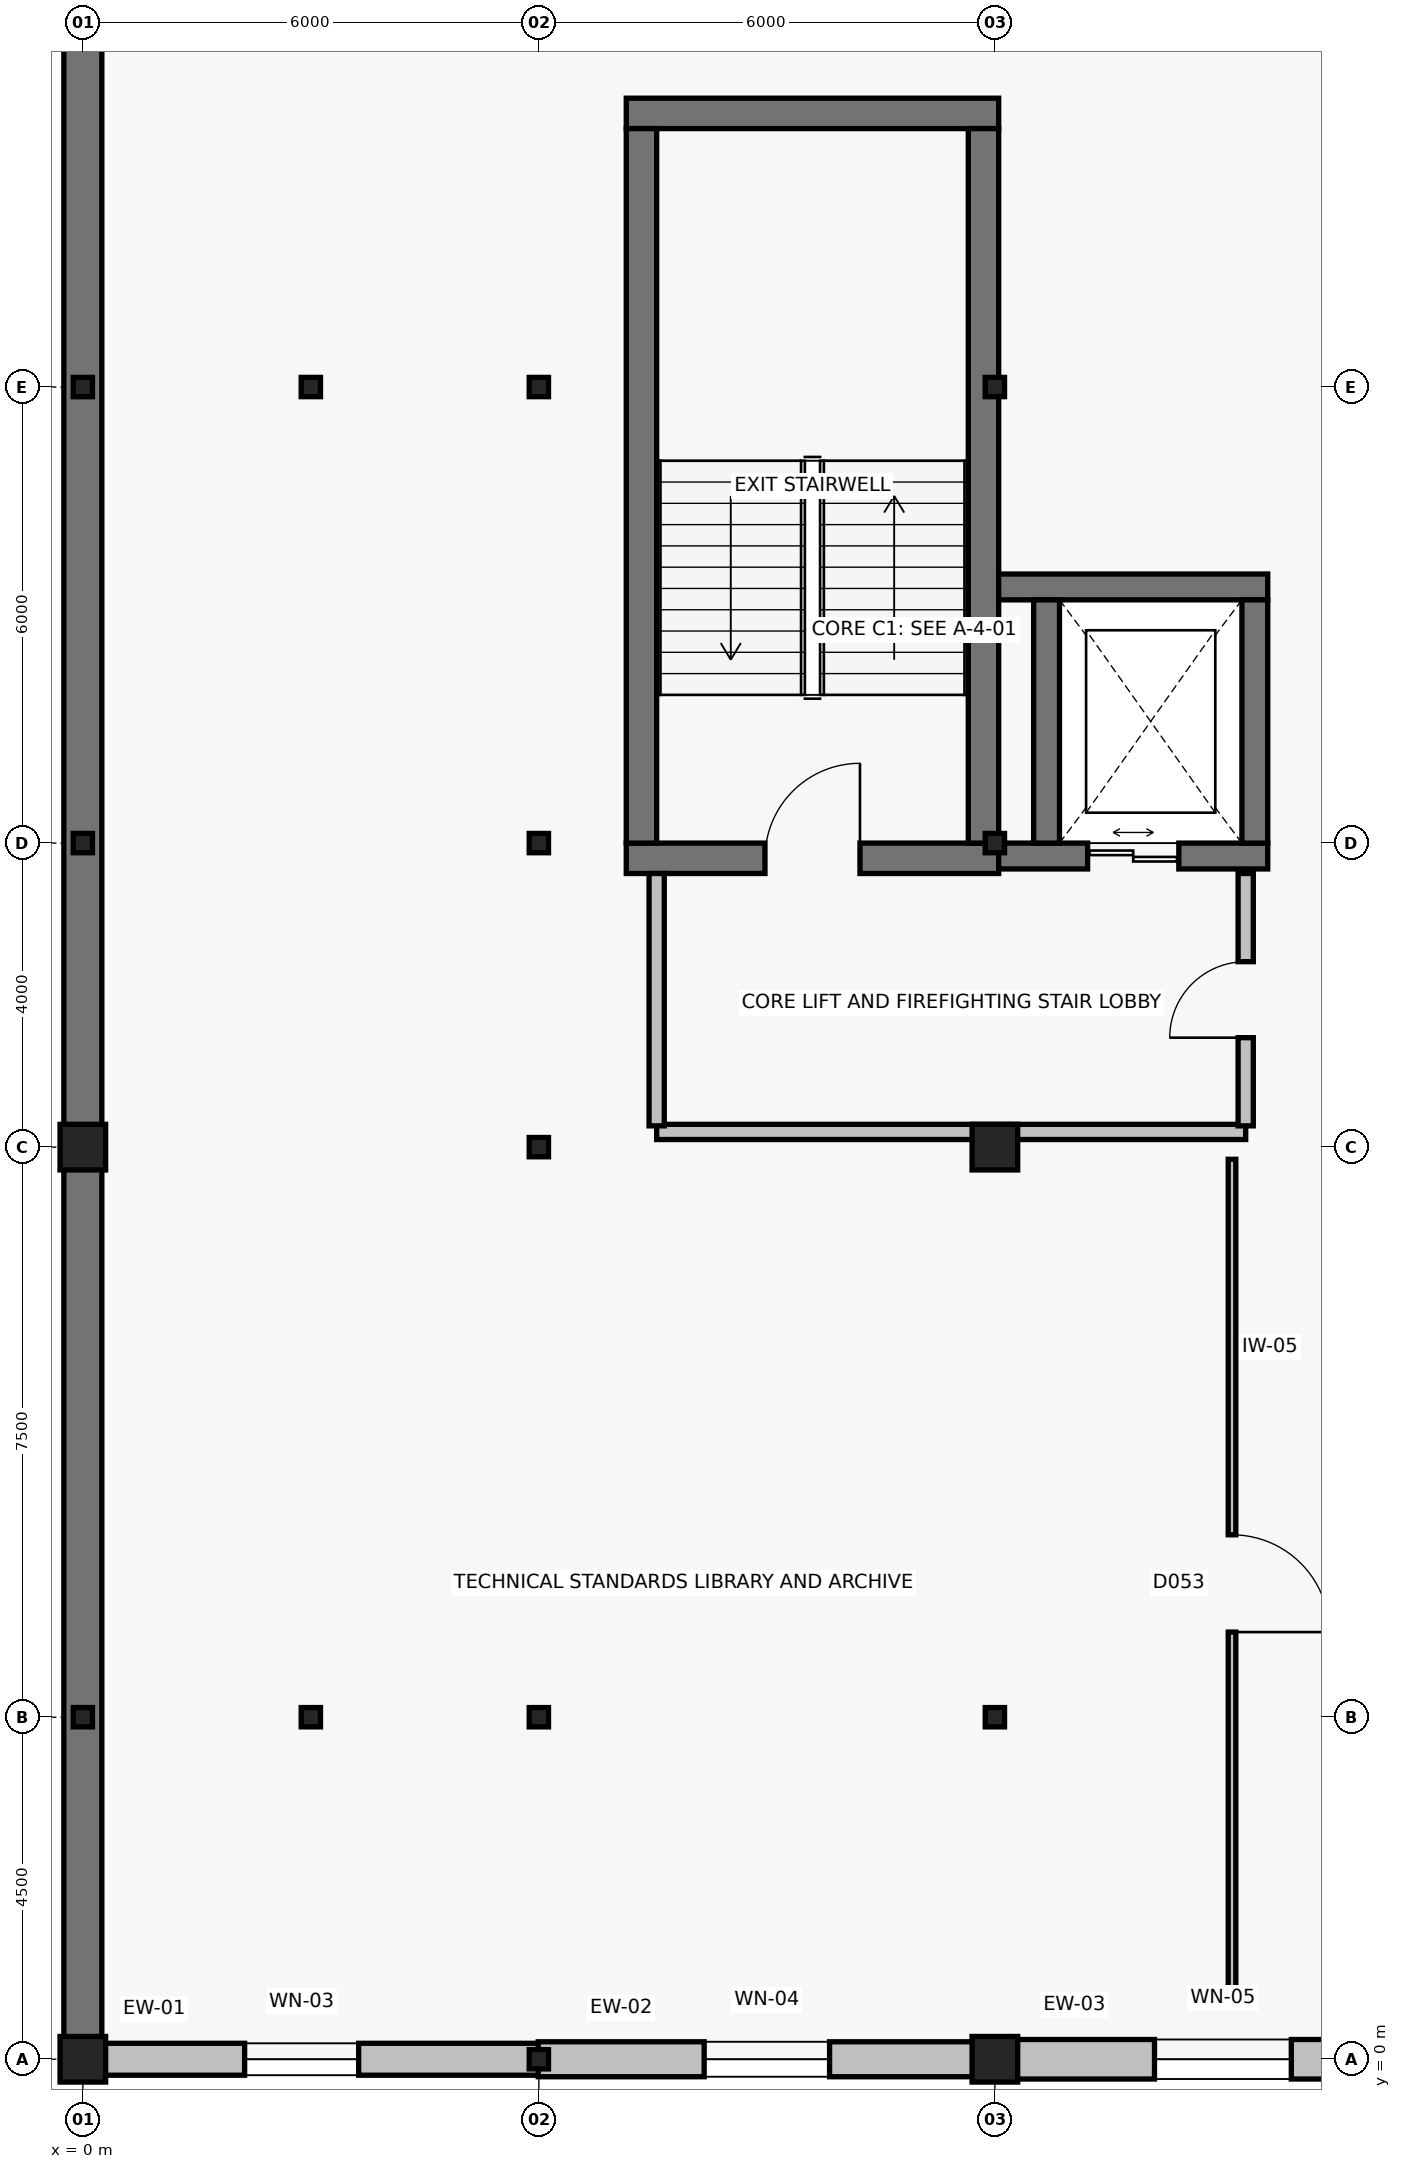
"""IFC4 building model, lengths in metres.
Left out: names, types, materials, properties, quantities, classifications, styles, units other than length and angle.
Written with IfcOpenShell. Run it as: python <this file> out.ifc"""

import sys

from ifc_helpers import new_model, si_unit, direction, frame, frame_2d, origin, origin_with_axes, origin_2d, place, context, subcontext, project, spatial, rectangle, hollow_rectangle, extrude, element, fill, save


model = new_model("IFC4")
c1 = context("Model", 3, precision=1e-05, world=origin(), true_north=direction((0.0, 1.0)))
c2 = subcontext(c1, "Body", "Model", "MODEL_VIEW")
j1 = project(units=[si_unit("LENGTHUNIT", "METRE"), si_unit("PLANEANGLEUNIT", "RADIAN")], contexts=[c1])
p1 = place(None, origin())
s1 = spatial("IfcSite", under=j1, at=p1, CompositionType="ELEMENT")
p2 = place(p1, origin())
s2 = spatial("IfcBuilding", under=s1, at=p2, CompositionType="ELEMENT")
p3 = place(p2, frame((0.0, 0.0, 15.4)))
s3 = spatial("IfcBuildingStorey", under=s2, at=p3, CompositionType="ELEMENT", Elevation=15.4)
p4 = place(p3, origin_with_axes())
e1 = element("IfcColumn", 1, at=p4, inside=s3, PredefinedType="COLUMN", context=c2, shape_type="SweptSolid", body=[
    extrude(rectangle(XDim=0.6, YDim=0.6, at=origin_2d()), origin(), (0.0, 0.0, 1.0), 4.0),
])
p5 = place(p3, frame((0.0, 4.5, 0.0), z_axis=(0.0, 0.0, 1.0), x_axis=(1.0, 0.0, 0.0)))
e2 = element("IfcColumn", 2, at=p5, inside=s3, PredefinedType="COLUMN", context=c2, shape_type="SweptSolid", body=[
    extrude(hollow_rectangle(XDim=0.254, YDim=0.254, WallThickness=0.01, InnerFilletRadius=0.01, OuterFilletRadius=0.019, at=origin_2d()), origin(), (0.0, 0.0, 1.0), 4.0),
])
p6 = place(p3, frame((0.0, 12.0, 0.0), z_axis=(0.0, 0.0, 1.0), x_axis=(1.0, 0.0, 0.0)))
e3 = element("IfcColumn", 3, at=p6, inside=s3, PredefinedType="COLUMN", context=c2, shape_type="SweptSolid", body=[
    extrude(rectangle(XDim=0.6, YDim=0.6, at=origin_2d()), origin(), (0.0, 0.0, 1.0), 4.0),
])
for number, where, z_axis, x_axis in (
    (4, (0.0, 16.0, 0.0), (0.0, 0.0, 1.0), (1.0, 0.0, 0.0)),
    (5, (0.0, 22.0, 0.0), (0.0, 0.0, 1.0), (1.0, 0.0, 0.0)),
    (6, (3.0, 4.5, 0.0), (0.0, 0.0, 1.0), (1.0, 0.0, 0.0)),
    (7, (3.0, 22.0, 0.0), (0.0, 0.0, 1.0), (1.0, 0.0, 0.0)),
    (8, (6.0, 0.0, 0.0), (0.0, 0.0, 1.0), (1.0, 0.0, 0.0)),
    (9, (6.0, 4.5, 0.0), (0.0, 0.0, 1.0), (1.0, 0.0, 0.0)),
    (10, (6.0, 12.0, 0.0), (0.0, 0.0, 1.0), (1.0, 0.0, 0.0)),
    (11, (6.0, 16.0, 0.0), (0.0, 0.0, 1.0), (1.0, 0.0, 0.0)),
    (12, (6.0, 22.0, 0.0), (0.0, 0.0, 1.0), (1.0, 0.0, 0.0)),
):
    element("IfcColumn", number, at=place(p3, frame(where, z_axis=z_axis, x_axis=x_axis)), inside=s3, PredefinedType="COLUMN", context=c2, shape_type="SweptSolid", body=[
        extrude(hollow_rectangle(XDim=0.254, YDim=0.254, WallThickness=0.01, InnerFilletRadius=0.01, OuterFilletRadius=0.019, at=origin_2d()), origin(), (0.0, 0.0, 1.0), 4.0),
    ])
p7 = place(p3, frame((12.0, 0.0, 0.0), z_axis=(0.0, 0.0, 1.0), x_axis=(1.0, 0.0, 0.0)))
e13 = element("IfcColumn", 13, at=p7, inside=s3, PredefinedType="COLUMN", context=c2, shape_type="SweptSolid", body=[
    extrude(rectangle(XDim=0.6, YDim=0.6, at=origin_2d()), origin(), (0.0, 0.0, 1.0), 4.0),
])
p8 = place(p3, frame((12.0, 4.5, 0.0), z_axis=(0.0, 0.0, 1.0), x_axis=(1.0, 0.0, 0.0)))
e14 = element("IfcColumn", 14, at=p8, inside=s3, PredefinedType="COLUMN", context=c2, shape_type="SweptSolid", body=[
    extrude(hollow_rectangle(XDim=0.254, YDim=0.254, WallThickness=0.01, InnerFilletRadius=0.01, OuterFilletRadius=0.019, at=origin_2d()), origin(), (0.0, 0.0, 1.0), 4.0),
])
p9 = place(p3, frame((12.0, 12.0, 0.0), z_axis=(0.0, 0.0, 1.0), x_axis=(1.0, 0.0, 0.0)))
e15 = element("IfcColumn", 15, at=p9, inside=s3, PredefinedType="COLUMN", context=c2, shape_type="SweptSolid", body=[
    extrude(rectangle(XDim=0.6, YDim=0.6, at=origin_2d()), origin(), (0.0, 0.0, 1.0), 4.0),
])
for number, where, z_axis, x_axis in (
    (16, (12.0, 16.0, 0.0), (0.0, 0.0, 1.0), (1.0, 0.0, 0.0)),
    (17, (12.0, 22.0, 0.0), (0.0, 0.0, 1.0), (1.0, 0.0, 0.0)),
):
    element("IfcColumn", number, at=place(p3, frame(where, z_axis=z_axis, x_axis=x_axis)), inside=s3, PredefinedType="COLUMN", context=c2, shape_type="SweptSolid", body=[
        extrude(hollow_rectangle(XDim=0.254, YDim=0.254, WallThickness=0.01, InnerFilletRadius=0.01, OuterFilletRadius=0.019, at=origin_2d()), origin(), (0.0, 0.0, 1.0), 4.0),
    ])
p10 = place(p3, frame((0.0, -0.008, 0.0), z_axis=(0.0, 0.0, 1.0), x_axis=(0.0, 1.0, 0.0)))
e18 = element("IfcWall", 18, at=p10, inside=s3, PredefinedType="SOLIDWALL", context=c2, shape_type="SweptSolid", body=[
    extrude(rectangle(XDim=74.016, YDim=0.5, at=frame_2d((37.008, 0.0))), origin(), (0.0, 0.0, 1.0), 3.68),
])
p11 = place(p3, frame((-0.25, 0.0, 0.0), z_axis=(0.0, 0.0, 1.0), x_axis=(1.0, 0.0, 0.0)))
e19 = element("IfcWall", 19, at=p11, inside=s3, PredefinedType="SOLIDWALL", context=c2, shape_type="SweptSolid", body=[
    extrude(rectangle(XDim=6.258, YDim=0.42, at=frame_2d((3.129, 0.0))), origin(), (0.0, 0.0, 1.0), 3.111),
])
p12 = place(p11, frame((2.379, 0.0, 0.9)))
e20 = element("IfcOpeningElement", 20, at=p12, cuts=e19, PredefinedType="OPENING", context=c2, shape_type="SweptSolid", body=[
    extrude(rectangle(XDim=1.5, YDim=1.8, at=frame_2d((0.75, 0.9))), frame((0.0, 0.225, 0.0), z_axis=(0.0, -1.0, 0.0), x_axis=(1.0, 0.0, 0.0)), (0.0, 0.0, 1.0), 0.45),
])
p13 = place(p3, frame((5.992, 0.0, 0.0), z_axis=(0.0, 0.0, 1.0), x_axis=(1.0, 0.0, 0.0)))
e21 = element("IfcWall", 21, at=p13, inside=s3, PredefinedType="SOLIDWALL", context=c2, shape_type="SweptSolid", body=[
    extrude(rectangle(XDim=6.016, YDim=0.46, at=frame_2d((3.008, 0.0))), origin(), (0.0, 0.0, 1.0), 3.111),
])
p14 = place(p13, frame((2.183, 0.0, 0.9)))
e22 = element("IfcOpeningElement", 22, at=p14, cuts=e21, PredefinedType="OPENING", context=c2, shape_type="SweptSolid", body=[
    extrude(rectangle(XDim=1.65, YDim=1.8, at=frame_2d((0.825, 0.9))), frame((0.0, 0.245, 0.0), z_axis=(0.0, -1.0, 0.0), x_axis=(1.0, 0.0, 0.0)), (0.0, 0.0, 1.0), 0.49),
])
p15 = place(p3, frame((11.992, 0.0, 0.0), z_axis=(0.0, 0.0, 1.0), x_axis=(1.0, 0.0, 0.0)))
e23 = element("IfcWall", 23, at=p15, inside=s3, PredefinedType="SOLIDWALL", context=c2, shape_type="SweptSolid", body=[
    extrude(rectangle(XDim=6.016, YDim=0.52, at=frame_2d((3.008, 0.0))), origin(), (0.0, 0.0, 1.0), 3.111),
])
p16 = place(p15, frame((2.108, 0.0, 0.9)))
e24 = element("IfcOpeningElement", 24, at=p16, cuts=e23, PredefinedType="OPENING", context=c2, shape_type="SweptSolid", body=[
    extrude(rectangle(XDim=1.8, YDim=1.8, at=frame_2d((0.9, 0.9))), frame((0.0, 0.275, 0.0), z_axis=(0.0, -1.0, 0.0), x_axis=(1.0, 0.0, 0.0)), (0.0, 0.0, 1.0), 0.55),
])
p17 = place(p3, frame((7.15, 15.8, 0.0), z_axis=(0.0, 0.0, 1.0), x_axis=(1.0, 0.0, 0.0)))
e25 = element("IfcWall", 25, at=p17, inside=s3, PredefinedType="SHEAR", context=c2, shape_type="SweptSolid", body=[
    extrude(rectangle(XDim=4.9, YDim=0.4, at=frame_2d((2.45, 0.0))), origin(), (0.0, 0.0, 1.0), 3.7),
])
p18 = place(p17, frame((1.825, 0.0, 0.0)))
e26 = element("IfcOpeningElement", 26, at=p18, cuts=e25, PredefinedType="OPENING", context=c2, shape_type="SweptSolid", body=[
    extrude(rectangle(XDim=1.25, YDim=2.2, at=frame_2d((0.625, 1.1))), frame((0.0, 0.215, 0.0), z_axis=(0.0, -1.0, 0.0), x_axis=(1.0, 0.0, 0.0)), (0.0, 0.0, 1.0), 0.43),
])
p19 = place(p3, frame((12.05, 25.6, 0.0), z_axis=(0.0, 0.0, 1.0), x_axis=(-1.0, 0.0, 0.0)))
e27 = element("IfcWall", 27, at=p19, inside=s3, PredefinedType="SHEAR", context=c2, shape_type="SweptSolid", body=[
    extrude(rectangle(XDim=4.9, YDim=0.4, at=frame_2d((2.45, 0.0))), origin(), (0.0, 0.0, 1.0), 3.7),
])
for number, where, z_axis, x_axis in (
    (28, (7.35, 25.4, 0.0), (0.0, 0.0, 1.0), (0.0, -1.0, 0.0)),
    (29, (11.85, 16.0, 0.0), (0.0, 0.0, 1.0), (0.0, 1.0, 0.0)),
):
    element("IfcWall", number, at=place(p3, frame(where, z_axis=z_axis, x_axis=x_axis)), inside=s3, PredefinedType="SHEAR", context=c2, shape_type="SweptSolid", body=[
        extrude(rectangle(XDim=9.4, YDim=0.4, at=frame_2d((4.7, 0.0))), origin(), (0.0, 0.0, 1.0), 3.7),
    ])
p20 = place(p3, frame((12.05, 15.83, 0.0), z_axis=(0.0, 0.0, 1.0), x_axis=(1.0, 0.0, 0.0)))
e30 = element("IfcWall", 30, at=p20, inside=s3, PredefinedType="SHEAR", context=c2, shape_type="SweptSolid", body=[
    extrude(rectangle(XDim=3.54, YDim=0.34, at=frame_2d((1.77, 0.0))), origin(), (0.0, 0.0, 1.0), 3.7),
])
p21 = place(p20, frame((1.17, 0.0, 0.0)))
e31 = element("IfcOpeningElement", 31, at=p21, cuts=e30, PredefinedType="OPENING", context=c2, shape_type="SweptSolid", body=[
    extrude(rectangle(XDim=1.2, YDim=2.2, at=frame_2d((0.6, 1.1))), frame((0.0, 0.185, 0.0), z_axis=(0.0, -1.0, 0.0), x_axis=(1.0, 0.0, 0.0)), (0.0, 0.0, 1.0), 0.37),
])
p22 = place(p3, frame((15.59, 19.37, 0.0), z_axis=(0.0, 0.0, 1.0), x_axis=(-1.0, 0.0, 0.0)))
e32 = element("IfcWall", 32, at=p22, inside=s3, PredefinedType="SHEAR", context=c2, shape_type="SweptSolid", body=[
    extrude(rectangle(XDim=3.54, YDim=0.34, at=frame_2d((1.77, 0.0))), origin(), (0.0, 0.0, 1.0), 3.7),
])
for number, where, z_axis, x_axis in (
    (33, (12.68, 19.2, 0.0), (0.0, 0.0, 1.0), (0.0, -1.0, 0.0)),
    (34, (15.42, 16.0, 0.0), (0.0, 0.0, 1.0), (0.0, 1.0, 0.0)),
):
    element("IfcWall", number, at=place(p3, frame(where, z_axis=z_axis, x_axis=x_axis)), inside=s3, PredefinedType="SHEAR", context=c2, shape_type="SweptSolid", body=[
        extrude(rectangle(XDim=3.2, YDim=0.34, at=frame_2d((1.6, 0.0))), origin(), (0.0, 0.0, 1.0), 3.7),
    ])
p23 = place(p3, frame((7.55, 12.2, 0.0), z_axis=(0.0, 0.0, 1.0), x_axis=(1.0, 0.0, 0.0)))
e35 = element("IfcWall", 35, at=p23, inside=s3, PredefinedType="PARTITIONING", context=c2, shape_type="SweptSolid", body=[
    extrude(rectangle(XDim=7.75, YDim=0.2, at=frame_2d((3.875, 0.0))), origin(), (0.0, 0.0, 1.0), 3.111),
])
p24 = place(p3, frame((7.55, 15.6, 0.0), z_axis=(0.0, 0.0, 1.0), x_axis=(0.0, -1.0, 0.0)))
e36 = element("IfcWall", 36, at=p24, inside=s3, PredefinedType="PARTITIONING", context=c2, shape_type="SweptSolid", body=[
    extrude(rectangle(XDim=3.32, YDim=0.2, at=frame_2d((1.66, 0.0))), origin(), (0.0, 0.0, 1.0), 3.296),
])
p25 = place(p3, frame((15.3, 12.28, 0.0), z_axis=(0.0, 0.0, 1.0), x_axis=(0.0, 1.0, 0.0)))
e37 = element("IfcWall", 37, at=p25, inside=s3, PredefinedType="PARTITIONING", context=c2, shape_type="SweptSolid", body=[
    extrude(rectangle(XDim=3.32, YDim=0.2, at=frame_2d((1.66, 0.0))), origin(), (0.0, 0.0, 1.0), 3.111),
])
p26 = place(p25, frame((1.16, 0.0, 0.0)))
e38 = element("IfcOpeningElement", 38, at=p26, cuts=e37, PredefinedType="OPENING", context=c2, shape_type="SweptSolid", body=[
    extrude(rectangle(XDim=1.0, YDim=2.15, at=frame_2d((0.5, 1.075))), frame((0.0, 0.115, 0.0), z_axis=(0.0, -1.0, 0.0), x_axis=(1.0, 0.0, 0.0)), (0.0, 0.0, 1.0), 0.23),
])
p27 = place(p3, frame((15.12, 11.84, 0.0), z_axis=(0.0, 0.0, 1.0), x_axis=(0.0, -1.0, 0.0)))
e39 = element("IfcWall", 39, at=p27, inside=s3, PredefinedType="PARTITIONING", context=c2, shape_type="SweptSolid", body=[
    extrude(rectangle(XDim=11.16, YDim=0.1, at=frame_2d((5.58, 0.0))), origin(), (0.0, 0.0, 1.0), 3.111),
])
p28 = place(p27, frame((4.94, 0.0, 0.0)))
e40 = element("IfcOpeningElement", 40, at=p28, cuts=e39, PredefinedType="OPENING", context=c2, shape_type="SweptSolid", body=[
    extrude(rectangle(XDim=1.28, YDim=2.2, at=frame_2d((0.64, 1.1))), frame((0.0, 0.065, 0.0), z_axis=(0.0, -1.0, 0.0), x_axis=(1.0, 0.0, 0.0)), (0.0, 0.0, 1.0), 0.13),
])
p29 = place(p12, origin())
e41 = element("IfcWindow", 41, at=p29, inside=s3, PartitioningType="SINGLE_PANEL", PredefinedType="WINDOW", context=c2, shape_type="SweptSolid", body=[
    extrude(rectangle(XDim=1.5, YDim=1.8, at=frame_2d((0.75, 0.9))), frame((0.0, 0.03, 0.0), z_axis=(0.0, -1.0, 0.0), x_axis=(1.0, 0.0, 0.0)), (0.0, 0.0, 1.0), 0.06),
])
fill(e20, e41)
p30 = place(p14, origin())
e42 = element("IfcWindow", 42, at=p30, inside=s3, PartitioningType="SINGLE_PANEL", PredefinedType="WINDOW", context=c2, shape_type="SweptSolid", body=[
    extrude(rectangle(XDim=1.65, YDim=1.8, at=frame_2d((0.825, 0.9))), frame((0.0, 0.03, 0.0), z_axis=(0.0, -1.0, 0.0), x_axis=(1.0, 0.0, 0.0)), (0.0, 0.0, 1.0), 0.06),
])
fill(e22, e42)
p31 = place(p16, origin())
e43 = element("IfcWindow", 43, at=p31, inside=s3, PartitioningType="SINGLE_PANEL", PredefinedType="WINDOW", context=c2, shape_type="SweptSolid", body=[
    extrude(rectangle(XDim=1.8, YDim=1.8, at=frame_2d((0.9, 0.9))), frame((0.0, 0.03, 0.0), z_axis=(0.0, -1.0, 0.0), x_axis=(1.0, 0.0, 0.0)), (0.0, 0.0, 1.0), 0.06),
])
fill(e24, e43)
p32 = place(p18, origin())
e44 = element("IfcDoor", 44, at=p32, inside=s3, OperationType="SINGLE_SWING_RIGHT", PredefinedType="DOOR", context=c2, shape_type="SweptSolid", body=[
    extrude(rectangle(XDim=1.25, YDim=2.2, at=frame_2d((0.625, 1.1))), frame((0.0, 0.025, 0.0), z_axis=(0.0, -1.0, 0.0), x_axis=(1.0, 0.0, 0.0)), (0.0, 0.0, 1.0), 0.05),
])
fill(e26, e44)
p33 = place(p21, origin())
e45 = element("IfcDoor", 45, at=p33, inside=s3, OperationType="DOUBLE_DOOR_SLIDING", PredefinedType="DOOR", context=c2, shape_type="SweptSolid", body=[
    extrude(rectangle(XDim=1.2, YDim=2.2, at=frame_2d((0.6, 1.1))), frame((0.0, 0.025, 0.0), z_axis=(0.0, -1.0, 0.0), x_axis=(1.0, 0.0, 0.0)), (0.0, 0.0, 1.0), 0.05),
])
fill(e31, e45)
p34 = place(p26, origin())
e46 = element("IfcDoor", 46, at=p34, inside=s3, OperationType="SINGLE_SWING_LEFT", PredefinedType="DOOR", context=c2, shape_type="SweptSolid", body=[
    extrude(rectangle(XDim=1.0, YDim=2.15, at=frame_2d((0.5, 1.075))), frame((0.0, 0.025, 0.0), z_axis=(0.0, -1.0, 0.0), x_axis=(1.0, 0.0, 0.0)), (0.0, 0.0, 1.0), 0.05),
])
fill(e38, e46)
p35 = place(p28, origin())
e47 = element("IfcDoor", 47, at=p35, inside=s3, OperationType="SINGLE_SWING_RIGHT", PredefinedType="DOOR", context=c2, shape_type="SweptSolid", body=[
    extrude(rectangle(XDim=1.28, YDim=2.2, at=frame_2d((0.64, 1.1))), frame((0.0, 0.025, 0.0), z_axis=(0.0, -1.0, 0.0), x_axis=(1.0, 0.0, 0.0)), (0.0, 0.0, 1.0), 0.05),
])
fill(e40, e47)
save(model, sys.argv[1])
